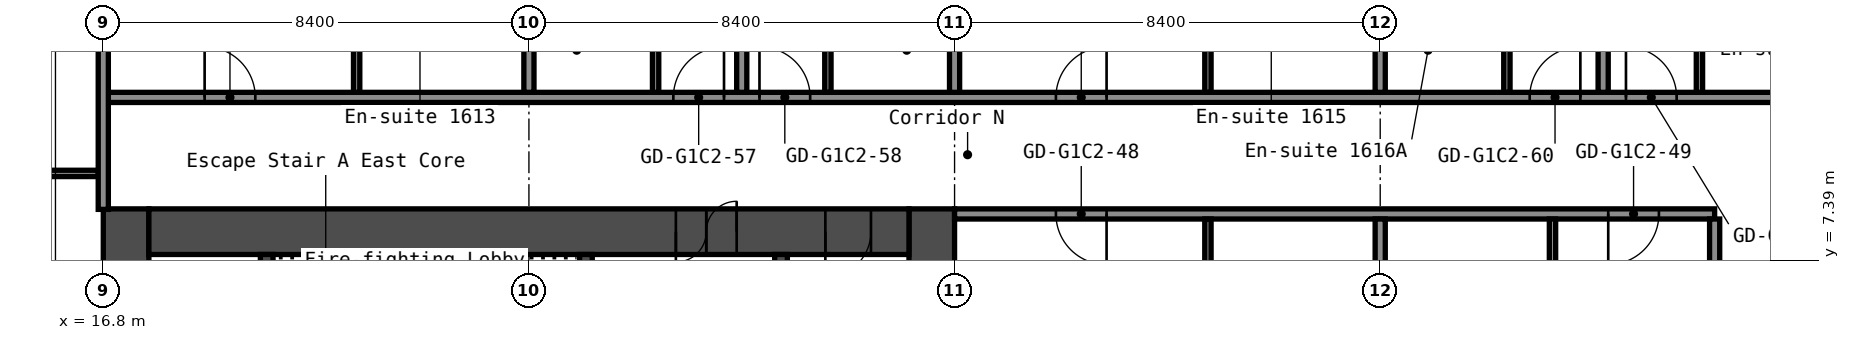
"""IFC4 building model, lengths in metres.
Left out: names, types, materials, properties, quantities, classifications, styles, units other than length and angle.
Written with IfcOpenShell. Run it as: python <this file> out.ifc"""

import sys

from ifc_helpers import new_model, si_unit, direction, frame, frame_2d, origin, place, context, subcontext, project, spatial, rectangle, extrude, element, fill, save


model = new_model("IFC4")
c1 = context("Model", 3, precision=1e-05, world=origin(), true_north=direction((0.0, 1.0)))
c2 = subcontext(c1, "Body", "Model", "MODEL_VIEW")
j1 = project(units=[si_unit("LENGTHUNIT", "METRE"), si_unit("PLANEANGLEUNIT", "RADIAN")], contexts=[c1])
p1 = place(None, origin())
s1 = spatial("IfcSite", under=j1, at=p1, CompositionType="ELEMENT")
p2 = place(p1, origin())
s2 = spatial("IfcBuilding", under=s1, at=p2, CompositionType="ELEMENT")
p3 = place(p2, frame((0.0, 0.0, 58.2)))
s3 = spatial("IfcBuildingStorey", under=s2, at=p3, CompositionType="ELEMENT", Elevation=58.2)
p4 = place(p3, frame((17.25, -8.4, 0.0), z_axis=(0.0, 0.0, 1.0), x_axis=(0.0, 1.0, 0.0)))
e1 = element("IfcWall", 1, at=p4, inside=s3, PredefinedType="SHEAR", context=c2, shape_type="SweptSolid", body=[
    extrude(rectangle(XDim=16.8, YDim=0.9, at=frame_2d((8.4, 0.0))), origin(), (0.0, 0.0, 1.0), 2.8),
])
p5 = place(p4, frame((12.75, 0.0, 0.0)))
e2 = element("IfcOpeningElement", 2, at=p5, cuts=e1, PredefinedType="OPENING", context=c2, shape_type="SweptSolid", body=[
    extrude(rectangle(XDim=1.2, YDim=2.1, at=frame_2d((0.6, 1.05))), frame((0.0, 0.46, 0.0), z_axis=(0.0, -1.0, 0.0), x_axis=(1.0, 0.0, 0.0)), (0.0, 0.0, 1.0), 0.92),
])
p6 = place(p4, frame((2.85, 0.0, 0.0)))
e3 = element("IfcOpeningElement", 3, at=p6, cuts=e1, PredefinedType="OPENING", context=c2, shape_type="SweptSolid", body=[
    extrude(rectangle(XDim=1.2, YDim=2.1, at=frame_2d((0.6, 1.05))), frame((0.0, 0.46, 0.0), z_axis=(0.0, -1.0, 0.0), x_axis=(1.0, 0.0, 0.0)), (0.0, 0.0, 1.0), 0.92),
])
p7 = place(p3, frame((33.15, -8.4, 0.0), z_axis=(0.0, 0.0, 1.0), x_axis=(0.0, 1.0, 0.0)))
e4 = element("IfcWall", 4, at=p7, inside=s3, PredefinedType="SHEAR", context=c2, shape_type="SweptSolid", body=[
    extrude(rectangle(XDim=16.8, YDim=0.9, at=frame_2d((8.4, 0.0))), origin(), (0.0, 0.0, 1.0), 2.8),
])
p8 = place(p3, frame((17.7, 7.95, 0.0), z_axis=(0.0, 0.0, 1.0), x_axis=(1.0, 0.0, 0.0)))
e5 = element("IfcWall", 5, at=p8, inside=s3, PredefinedType="SHEAR", context=c2, shape_type="SweptSolid", body=[
    extrude(rectangle(XDim=15.0, YDim=0.9, at=frame_2d((7.5, 0.0))), origin(), (0.0, 0.0, 1.0), 2.8),
])
p9 = place(p8, frame((10.4, 0.0, 0.0)))
e6 = element("IfcOpeningElement", 6, at=p9, cuts=e5, PredefinedType="OPENING", context=c2, shape_type="SweptSolid", body=[
    extrude(rectangle(XDim=1.2, YDim=2.1, at=frame_2d((0.6, 1.05))), frame((0.0, 0.46, 0.0), z_axis=(0.0, -1.0, 0.0), x_axis=(1.0, 0.0, 0.0)), (0.0, 0.0, 1.0), 0.92),
])
p10 = place(p8, frame((13.35, 0.0, 0.0)))
e7 = element("IfcOpeningElement", 7, at=p10, cuts=e5, PredefinedType="OPENING", context=c2, shape_type="SweptSolid", body=[
    extrude(rectangle(XDim=0.9, YDim=2.1, at=frame_2d((0.45, 1.05))), frame((0.0, 0.46, 0.0), z_axis=(0.0, -1.0, 0.0), x_axis=(1.0, 0.0, 0.0)), (0.0, 0.0, 1.0), 0.92),
])
p11 = place(p3, frame((20.025, 1.2, 0.0), z_axis=(0.0, 0.0, 1.0), x_axis=(0.0, 1.0, 0.0)))
e8 = element("IfcWall", 8, at=p11, inside=s3, PredefinedType="SHEAR", context=c2, shape_type="SweptSolid", body=[
    extrude(rectangle(XDim=6.3, YDim=0.25, at=frame_2d((3.15, 0.0))), origin(), (0.0, 0.0, 1.0), 2.8),
])
p12 = place(p3, frame((26.325, 3.75, 0.0), z_axis=(0.0, 0.0, 1.0), x_axis=(0.0, 1.0, 0.0)))
e9 = element("IfcWall", 9, at=p12, inside=s3, PredefinedType="SHEAR", context=c2, shape_type="SweptSolid", body=[
    extrude(rectangle(XDim=3.75, YDim=0.25, at=frame_2d((1.875, 0.0))), origin(), (0.0, 0.0, 1.0), 2.8),
])
p13 = place(p12, frame((1.25, 0.0, 0.0)))
e10 = element("IfcOpeningElement", 10, at=p13, cuts=e9, PredefinedType="OPENING", context=c2, shape_type="SweptSolid", body=[
    extrude(rectangle(XDim=1.2, YDim=2.1, at=frame_2d((0.6, 1.05))), frame((0.0, 0.135, 0.0), z_axis=(0.0, -1.0, 0.0), x_axis=(1.0, 0.0, 0.0)), (0.0, 0.0, 1.0), 0.27),
])
p14 = place(p3, frame((30.175, 1.45, 0.0), z_axis=(0.0, 0.0, 1.0), x_axis=(0.0, 1.0, 0.0)))
e11 = element("IfcWall", 11, at=p14, inside=s3, PredefinedType="SHEAR", context=c2, shape_type="SweptSolid", body=[
    extrude(rectangle(XDim=6.05, YDim=0.25, at=frame_2d((3.025, 0.0))), origin(), (0.0, 0.0, 1.0), 2.8),
])
p15 = place(p14, frame((2.625, 0.0, 0.0)))
e12 = element("IfcOpeningElement", 12, at=p15, cuts=e11, PredefinedType="OPENING", context=c2, shape_type="SweptSolid", body=[
    extrude(rectangle(XDim=1.1, YDim=2.1, at=frame_2d((0.55, 1.05))), frame((0.0, 0.135, 0.0), z_axis=(0.0, -1.0, 0.0), x_axis=(1.0, 0.0, 0.0)), (0.0, 0.0, 1.0), 0.27),
])
p16 = place(p3, frame((33.6, 8.3, 0.0), z_axis=(0.0, 0.0, 1.0), x_axis=(1.0, 0.0, 0.0)))
e13 = element("IfcWall", 13, at=p16, inside=s3, PredefinedType="PARTITIONING", context=c2, shape_type="SweptSolid", body=[
    extrude(rectangle(XDim=15.0, YDim=0.2, at=frame_2d((7.5, 0.0))), origin(), (0.0, 0.0, 1.0), 2.8),
])
p17 = place(p16, frame((2.0, 0.0, 0.0)))
e14 = element("IfcOpeningElement", 14, at=p17, cuts=e13, PredefinedType="OPENING", context=c2, shape_type="SweptSolid", body=[
    extrude(rectangle(XDim=1.0, YDim=2.1, at=frame_2d((0.5, 1.05))), frame((0.0, 0.11, 0.0), z_axis=(0.0, -1.0, 0.0), x_axis=(1.0, 0.0, 0.0)), (0.0, 0.0, 1.0), 0.22),
])
p18 = place(p16, frame((12.9, 0.0, 0.0)))
e15 = element("IfcOpeningElement", 15, at=p18, cuts=e13, PredefinedType="OPENING", context=c2, shape_type="SweptSolid", body=[
    extrude(rectangle(XDim=1.0, YDim=2.1, at=frame_2d((0.5, 1.05))), frame((0.0, 0.11, 0.0), z_axis=(0.0, -1.0, 0.0), x_axis=(1.0, 0.0, 0.0)), (0.0, 0.0, 1.0), 0.22),
])
p19 = place(p3, frame((14.363, 9.1, 0.0), z_axis=(0.0, 0.0, 1.0), x_axis=(1.0, 0.0, 0.0)))
e16 = element("IfcWall", 16, at=p19, inside=s3, PredefinedType="PARTITIONING", context=c2, shape_type="SweptSolid", body=[
    extrude(rectangle(XDim=2.337, YDim=0.125, at=frame_2d((1.169, 0.0))), origin(), (0.0, 0.0, 1.0), 2.8),
])
p20 = place(p3, frame((16.8, 10.6, 0.0), z_axis=(0.0, 0.0, 1.0), x_axis=(1.0, 0.0, 0.0)))
e17 = element("IfcWall", 17, at=p20, inside=s3, PredefinedType="PARTITIONING", context=c2, shape_type="SweptSolid", body=[
    extrude(rectangle(XDim=34.3, YDim=0.2, at=frame_2d((17.15, 0.0))), origin(), (0.0, 0.0, 1.0), 2.8),
])
p21 = place(p20, frame((2.0, 0.0, 0.0)))
e18 = element("IfcOpeningElement", 18, at=p21, cuts=e17, PredefinedType="OPENING", context=c2, shape_type="SweptSolid", body=[
    extrude(rectangle(XDim=1.0, YDim=2.1, at=frame_2d((0.5, 1.05))), frame((0.0, 0.11, 0.0), z_axis=(0.0, -1.0, 0.0), x_axis=(1.0, 0.0, 0.0)), (0.0, 0.0, 1.0), 0.22),
])
p22 = place(p20, frame((11.25, 0.0, 0.0)))
e19 = element("IfcOpeningElement", 19, at=p22, cuts=e17, PredefinedType="OPENING", context=c2, shape_type="SweptSolid", body=[
    extrude(rectangle(XDim=1.0, YDim=2.1, at=frame_2d((0.5, 1.05))), frame((0.0, 0.11, 0.0), z_axis=(0.0, -1.0, 0.0), x_axis=(1.0, 0.0, 0.0)), (0.0, 0.0, 1.0), 0.22),
])
p23 = place(p20, frame((12.95, 0.0, 0.0)))
e20 = element("IfcOpeningElement", 20, at=p23, cuts=e17, PredefinedType="OPENING", context=c2, shape_type="SweptSolid", body=[
    extrude(rectangle(XDim=1.0, YDim=2.1, at=frame_2d((0.5, 1.05))), frame((0.0, 0.11, 0.0), z_axis=(0.0, -1.0, 0.0), x_axis=(1.0, 0.0, 0.0)), (0.0, 0.0, 1.0), 0.22),
])
p24 = place(p20, frame((18.8, 0.0, 0.0)))
e21 = element("IfcOpeningElement", 21, at=p24, cuts=e17, PredefinedType="OPENING", context=c2, shape_type="SweptSolid", body=[
    extrude(rectangle(XDim=1.0, YDim=2.1, at=frame_2d((0.5, 1.05))), frame((0.0, 0.11, 0.0), z_axis=(0.0, -1.0, 0.0), x_axis=(1.0, 0.0, 0.0)), (0.0, 0.0, 1.0), 0.22),
])
p25 = place(p20, frame((28.15, 0.0, 0.0)))
e22 = element("IfcOpeningElement", 22, at=p25, cuts=e17, PredefinedType="OPENING", context=c2, shape_type="SweptSolid", body=[
    extrude(rectangle(XDim=1.0, YDim=2.1, at=frame_2d((0.5, 1.05))), frame((0.0, 0.11, 0.0), z_axis=(0.0, -1.0, 0.0), x_axis=(1.0, 0.0, 0.0)), (0.0, 0.0, 1.0), 0.22),
])
p26 = place(p20, frame((30.05, 0.0, 0.0)))
e23 = element("IfcOpeningElement", 23, at=p26, cuts=e17, PredefinedType="OPENING", context=c2, shape_type="SweptSolid", body=[
    extrude(rectangle(XDim=1.0, YDim=2.1, at=frame_2d((0.5, 1.05))), frame((0.0, 0.11, 0.0), z_axis=(0.0, -1.0, 0.0), x_axis=(1.0, 0.0, 0.0)), (0.0, 0.0, 1.0), 0.22),
])
p27 = place(p3, frame((16.8, 8.39, 0.0), z_axis=(0.0, 0.0, 1.0), x_axis=(0.0, 1.0, 0.0)))
e24 = element("IfcWall", 24, at=p27, inside=s3, PredefinedType="PARTITIONING", context=c2, shape_type="SweptSolid", body=[
    extrude(rectangle(XDim=11.91, YDim=0.2, at=frame_2d((5.955, 0.0))), origin(), (0.0, 0.0, 1.0), 2.8),
])
p28 = place(p3, frame((21.8, 10.7, 0.0), z_axis=(0.0, 0.0, 1.0), x_axis=(0.0, 1.0, 0.0)))
e25 = element("IfcWall", 25, at=p28, inside=s3, PredefinedType="PARTITIONING", context=c2, shape_type="SweptSolid", body=[
    extrude(rectangle(XDim=3.3, YDim=0.125, at=frame_2d((1.65, 0.0))), origin(), (0.0, 0.0, 1.0), 2.8),
])
p29 = place(p3, frame((25.2, 10.7, 0.0), z_axis=(0.0, 0.0, 1.0), x_axis=(0.0, 1.0, 0.0)))
e26 = element("IfcWall", 26, at=p29, inside=s3, PredefinedType="PARTITIONING", context=c2, shape_type="SweptSolid", body=[
    extrude(rectangle(XDim=9.6, YDim=0.2, at=frame_2d((4.8, 0.0))), origin(), (0.0, 0.0, 1.0), 2.8),
])
p30 = place(p3, frame((27.7, 10.7, 0.0), z_axis=(0.0, 0.0, 1.0), x_axis=(0.0, 1.0, 0.0)))
e27 = element("IfcWall", 27, at=p30, inside=s3, PredefinedType="PARTITIONING", context=c2, shape_type="SweptSolid", body=[
    extrude(rectangle(XDim=2.9, YDim=0.125, at=frame_2d((1.45, 0.0))), origin(), (0.0, 0.0, 1.0), 2.8),
])
p31 = place(p30, frame((1.5, 0.0, 0.0)))
e28 = element("IfcOpeningElement", 28, at=p31, cuts=e27, PredefinedType="OPENING", context=c2, shape_type="SweptSolid", body=[
    extrude(rectangle(XDim=0.8, YDim=2.1, at=frame_2d((0.4, 1.05))), frame((0.0, 0.073, 0.0), z_axis=(0.0, -1.0, 0.0), x_axis=(1.0, 0.0, 0.0)), (0.0, 0.0, 1.0), 0.145),
])
p32 = place(p3, frame((29.4, 10.7, 0.0), z_axis=(0.0, 0.0, 1.0), x_axis=(0.0, 1.0, 0.0)))
e29 = element("IfcWall", 29, at=p32, inside=s3, PredefinedType="PARTITIONING", context=c2, shape_type="SweptSolid", body=[
    extrude(rectangle(XDim=9.6, YDim=0.2, at=frame_2d((4.8, 0.0))), origin(), (0.0, 0.0, 1.0), 2.8),
])
p33 = place(p3, frame((31.1, 10.7, 0.0), z_axis=(0.0, 0.0, 1.0), x_axis=(0.0, 1.0, 0.0)))
e30 = element("IfcWall", 30, at=p33, inside=s3, PredefinedType="PARTITIONING", context=c2, shape_type="SweptSolid", body=[
    extrude(rectangle(XDim=2.9, YDim=0.125, at=frame_2d((1.45, 0.0))), origin(), (0.0, 0.0, 1.0), 2.8),
])
p34 = place(p33, frame((1.5, 0.0, 0.0)))
e31 = element("IfcOpeningElement", 31, at=p34, cuts=e30, PredefinedType="OPENING", context=c2, shape_type="SweptSolid", body=[
    extrude(rectangle(XDim=0.8, YDim=2.1, at=frame_2d((0.4, 1.05))), frame((0.0, 0.073, 0.0), z_axis=(0.0, -1.0, 0.0), x_axis=(1.0, 0.0, 0.0)), (0.0, 0.0, 1.0), 0.145),
])
p35 = place(p3, frame((33.6, 10.7, 0.0), z_axis=(0.0, 0.0, 1.0), x_axis=(0.0, 1.0, 0.0)))
e32 = element("IfcWall", 32, at=p35, inside=s3, PredefinedType="PARTITIONING", context=c2, shape_type="SweptSolid", body=[
    extrude(rectangle(XDim=9.6, YDim=0.2, at=frame_2d((4.8, 0.0))), origin(), (0.0, 0.0, 1.0), 2.8),
])
for number, where, z_axis, x_axis in (
    (33, (38.6, 4.9, 0.0), (0.0, 0.0, 1.0), (0.0, 1.0, 0.0)),
    (34, (38.6, 10.7, 0.0), (0.0, 0.0, 1.0), (0.0, 1.0, 0.0)),
):
    element("IfcWall", number, at=place(p3, frame(where, z_axis=z_axis, x_axis=x_axis)), inside=s3, PredefinedType="PARTITIONING", context=c2, shape_type="SweptSolid", body=[
        extrude(rectangle(XDim=3.3, YDim=0.125, at=frame_2d((1.65, 0.0))), origin(), (0.0, 0.0, 1.0), 2.8),
    ])
p36 = place(p3, frame((42.0, -8.2, 0.0), z_axis=(0.0, 0.0, 1.0), x_axis=(0.0, 1.0, 0.0)))
e35 = element("IfcWall", 35, at=p36, inside=s3, PredefinedType="PARTITIONING", context=c2, shape_type="SweptSolid", body=[
    extrude(rectangle(XDim=16.4, YDim=0.2, at=frame_2d((8.2, 0.0))), origin(), (0.0, 0.0, 1.0), 2.8),
])
p37 = place(p3, frame((42.0, 10.7, 0.0), z_axis=(0.0, 0.0, 1.0), x_axis=(0.0, 1.0, 0.0)))
e36 = element("IfcWall", 36, at=p37, inside=s3, PredefinedType="PARTITIONING", context=c2, shape_type="SweptSolid", body=[
    extrude(rectangle(XDim=9.6, YDim=0.2, at=frame_2d((4.8, 0.0))), origin(), (0.0, 0.0, 1.0), 2.8),
])
p38 = place(p3, frame((44.5, 10.7, 0.0), z_axis=(0.0, 0.0, 1.0), x_axis=(0.0, 1.0, 0.0)))
e37 = element("IfcWall", 37, at=p38, inside=s3, PredefinedType="PARTITIONING", context=c2, shape_type="SweptSolid", body=[
    extrude(rectangle(XDim=2.9, YDim=0.125, at=frame_2d((1.45, 0.0))), origin(), (0.0, 0.0, 1.0), 2.8),
])
p39 = place(p38, frame((1.5, 0.0, 0.0)))
e38 = element("IfcOpeningElement", 38, at=p39, cuts=e37, PredefinedType="OPENING", context=c2, shape_type="SweptSolid", body=[
    extrude(rectangle(XDim=0.8, YDim=2.1, at=frame_2d((0.4, 1.05))), frame((0.0, 0.073, 0.0), z_axis=(0.0, -1.0, 0.0), x_axis=(1.0, 0.0, 0.0)), (0.0, 0.0, 1.0), 0.145),
])
p40 = place(p3, frame((45.4, 4.9, 0.0), z_axis=(0.0, 0.0, 1.0), x_axis=(0.0, 1.0, 0.0)))
e39 = element("IfcWall", 39, at=p40, inside=s3, PredefinedType="PARTITIONING", context=c2, shape_type="SweptSolid", body=[
    extrude(rectangle(XDim=3.3, YDim=0.125, at=frame_2d((1.65, 0.0))), origin(), (0.0, 0.0, 1.0), 2.8),
])
p41 = place(p3, frame((46.4, 10.7, 0.0), z_axis=(0.0, 0.0, 1.0), x_axis=(0.0, 1.0, 0.0)))
e40 = element("IfcWall", 40, at=p41, inside=s3, PredefinedType="PARTITIONING", context=c2, shape_type="SweptSolid", body=[
    extrude(rectangle(XDim=9.6, YDim=0.2, at=frame_2d((4.8, 0.0))), origin(), (0.0, 0.0, 1.0), 2.8),
])
p42 = place(p3, frame((48.3, 10.7, 0.0), z_axis=(0.0, 0.0, 1.0), x_axis=(0.0, 1.0, 0.0)))
e41 = element("IfcWall", 41, at=p42, inside=s3, PredefinedType="PARTITIONING", context=c2, shape_type="SweptSolid", body=[
    extrude(rectangle(XDim=2.9, YDim=0.125, at=frame_2d((1.45, 0.0))), origin(), (0.0, 0.0, 1.0), 2.8),
])
p43 = place(p42, frame((1.5, 0.0, 0.0)))
e42 = element("IfcOpeningElement", 42, at=p43, cuts=e41, PredefinedType="OPENING", context=c2, shape_type="SweptSolid", body=[
    extrude(rectangle(XDim=0.8, YDim=2.1, at=frame_2d((0.4, 1.05))), frame((0.0, 0.073, 0.0), z_axis=(0.0, -1.0, 0.0), x_axis=(1.0, 0.0, 0.0)), (0.0, 0.0, 1.0), 0.145),
])
p44 = place(p3, frame((48.6, -8.2, 0.0), z_axis=(0.0, 0.0, 1.0), x_axis=(0.0, 1.0, 0.0)))
e43 = element("IfcWall", 43, at=p44, inside=s3, PredefinedType="PARTITIONING", context=c2, shape_type="SweptSolid", body=[
    extrude(rectangle(XDim=16.4, YDim=0.2, at=frame_2d((8.2, 0.0))), origin(), (0.0, 0.0, 1.0), 2.8),
])
p45 = place(p9, origin())
e44 = element("IfcDoor", 44, at=p45, inside=s3, OperationType="DOUBLE_DOOR_SINGLE_SWING", PredefinedType="DOOR", context=c2, shape_type="SweptSolid", body=[
    extrude(rectangle(XDim=1.2, YDim=2.1, at=frame_2d((0.6, 1.05))), frame((0.0, 0.025, 0.0), z_axis=(0.0, -1.0, 0.0), x_axis=(1.0, 0.0, 0.0)), (0.0, 0.0, 1.0), 0.05),
])
fill(e6, e44)
p46 = place(p10, origin())
e45 = element("IfcDoor", 45, at=p46, inside=s3, OperationType="SINGLE_SWING_LEFT", PredefinedType="DOOR", context=c2, shape_type="SweptSolid", body=[
    extrude(rectangle(XDim=0.9, YDim=2.1, at=frame_2d((0.45, 1.05))), frame((0.0, 0.025, 0.0), z_axis=(0.0, -1.0, 0.0), x_axis=(1.0, 0.0, 0.0)), (0.0, 0.0, 1.0), 0.05),
])
fill(e7, e45)
p47 = place(p17, origin())
e46 = element("IfcDoor", 46, at=p47, inside=s3, OperationType="SINGLE_SWING_RIGHT", PredefinedType="DOOR", context=c2, shape_type="SweptSolid", body=[
    extrude(rectangle(XDim=1.0, YDim=2.1, at=frame_2d((0.5, 1.05))), frame((0.0, 0.025, 0.0), z_axis=(0.0, -1.0, 0.0), x_axis=(1.0, 0.0, 0.0)), (0.0, 0.0, 1.0), 0.05),
])
fill(e14, e46)
p48 = place(p18, origin())
e47 = element("IfcDoor", 47, at=p48, inside=s3, OperationType="SINGLE_SWING_LEFT", PredefinedType="DOOR", context=c2, shape_type="SweptSolid", body=[
    extrude(rectangle(XDim=1.0, YDim=2.1, at=frame_2d((0.5, 1.05))), frame((0.0, 0.025, 0.0), z_axis=(0.0, -1.0, 0.0), x_axis=(1.0, 0.0, 0.0)), (0.0, 0.0, 1.0), 0.05),
])
fill(e15, e47)
p49 = place(p21, origin())
e48 = element("IfcDoor", 48, at=p49, inside=s3, OperationType="SINGLE_SWING_RIGHT", PredefinedType="DOOR", context=c2, shape_type="SweptSolid", body=[
    extrude(rectangle(XDim=1.0, YDim=2.1, at=frame_2d((0.5, 1.05))), frame((0.0, 0.025, 0.0), z_axis=(0.0, -1.0, 0.0), x_axis=(1.0, 0.0, 0.0)), (0.0, 0.0, 1.0), 0.05),
])
fill(e18, e48)
p50 = place(p22, origin())
e49 = element("IfcDoor", 49, at=p50, inside=s3, OperationType="SINGLE_SWING_LEFT", PredefinedType="DOOR", context=c2, shape_type="SweptSolid", body=[
    extrude(rectangle(XDim=1.0, YDim=2.1, at=frame_2d((0.5, 1.05))), frame((0.0, 0.025, 0.0), z_axis=(0.0, -1.0, 0.0), x_axis=(1.0, 0.0, 0.0)), (0.0, 0.0, 1.0), 0.05),
])
fill(e19, e49)
p51 = place(p23, origin())
e50 = element("IfcDoor", 50, at=p51, inside=s3, OperationType="SINGLE_SWING_RIGHT", PredefinedType="DOOR", context=c2, shape_type="SweptSolid", body=[
    extrude(rectangle(XDim=1.0, YDim=2.1, at=frame_2d((0.5, 1.05))), frame((0.0, 0.025, 0.0), z_axis=(0.0, -1.0, 0.0), x_axis=(1.0, 0.0, 0.0)), (0.0, 0.0, 1.0), 0.05),
])
fill(e20, e50)
p52 = place(p24, origin())
e51 = element("IfcDoor", 51, at=p52, inside=s3, OperationType="SINGLE_SWING_LEFT", PredefinedType="DOOR", context=c2, shape_type="SweptSolid", body=[
    extrude(rectangle(XDim=1.0, YDim=2.1, at=frame_2d((0.5, 1.05))), frame((0.0, 0.025, 0.0), z_axis=(0.0, -1.0, 0.0), x_axis=(1.0, 0.0, 0.0)), (0.0, 0.0, 1.0), 0.05),
])
fill(e21, e51)
p53 = place(p25, origin())
e52 = element("IfcDoor", 52, at=p53, inside=s3, OperationType="SINGLE_SWING_LEFT", PredefinedType="DOOR", context=c2, shape_type="SweptSolid", body=[
    extrude(rectangle(XDim=1.0, YDim=2.1, at=frame_2d((0.5, 1.05))), frame((0.0, 0.025, 0.0), z_axis=(0.0, -1.0, 0.0), x_axis=(1.0, 0.0, 0.0)), (0.0, 0.0, 1.0), 0.05),
])
fill(e22, e52)
p54 = place(p26, origin())
e53 = element("IfcDoor", 53, at=p54, inside=s3, OperationType="SINGLE_SWING_RIGHT", PredefinedType="DOOR", context=c2, shape_type="SweptSolid", body=[
    extrude(rectangle(XDim=1.0, YDim=2.1, at=frame_2d((0.5, 1.05))), frame((0.0, 0.025, 0.0), z_axis=(0.0, -1.0, 0.0), x_axis=(1.0, 0.0, 0.0)), (0.0, 0.0, 1.0), 0.05),
])
fill(e23, e53)
save(model, sys.argv[1])
